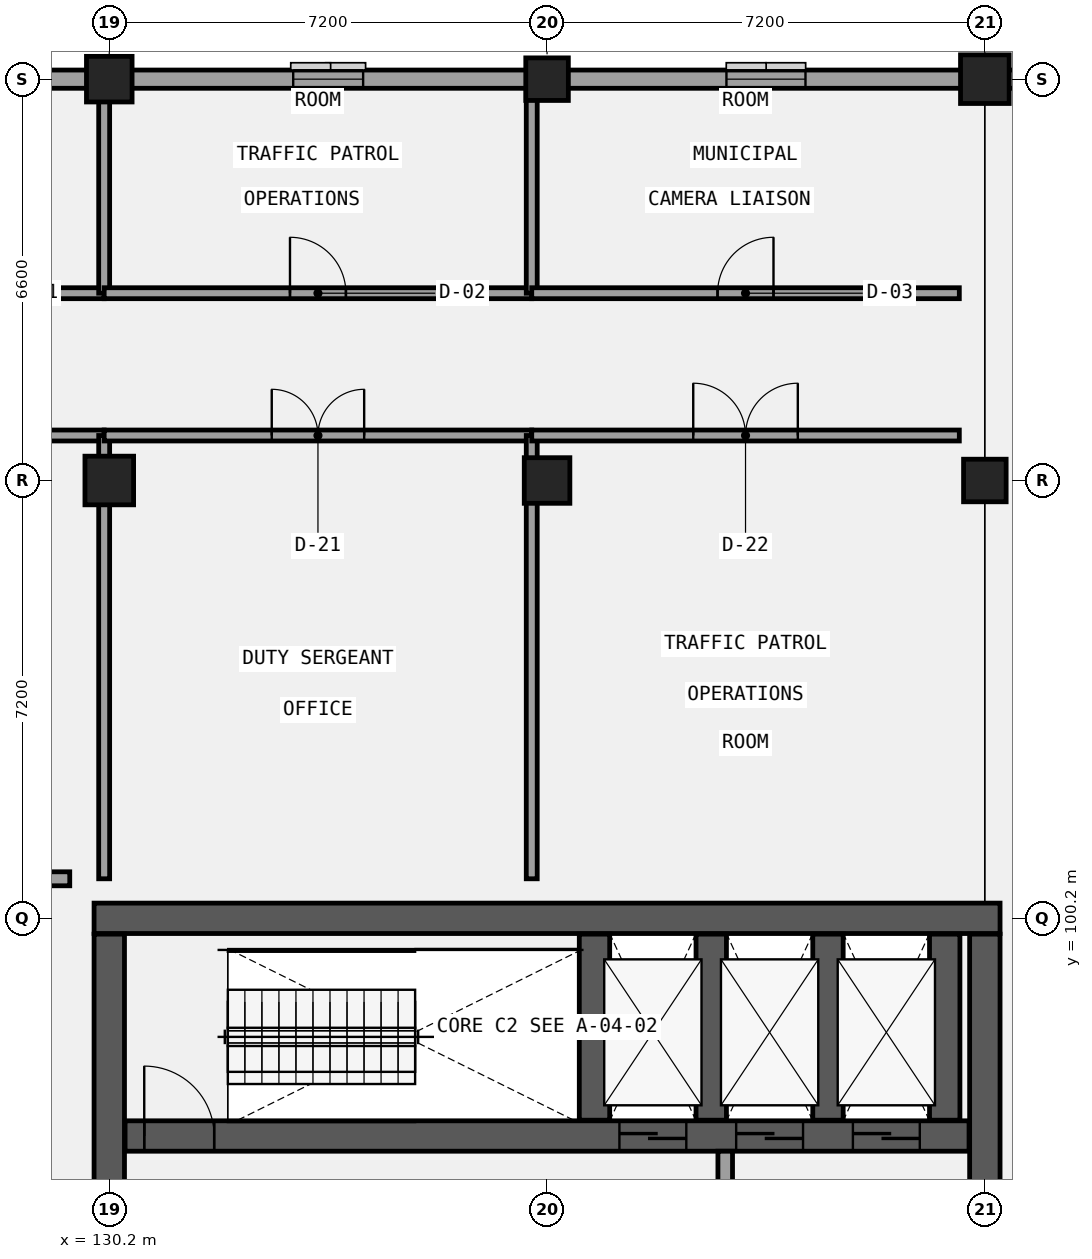
"""IFC4 building model, lengths in metres.
Left out: names, types, materials, properties, quantities, classifications, styles, units other than length and angle.
Written with IfcOpenShell. Run it as: python <this file> out.ifc"""

import sys

from ifc_helpers import new_model, si_unit, direction, frame, frame_2d, origin, origin_2d, place, context, subcontext, project, spatial, rectangle, extrude, element, fill, save


model = new_model("IFC4")
c1 = context("Model", 3, precision=1e-05, world=origin(), true_north=direction((0.0, 1.0)))
c2 = subcontext(c1, "Body", "Model", "MODEL_VIEW")
j1 = project(units=[si_unit("LENGTHUNIT", "METRE"), si_unit("PLANEANGLEUNIT", "RADIAN")], contexts=[c1])
p1 = place(None, origin())
s1 = spatial("IfcSite", under=j1, at=p1, CompositionType="ELEMENT")
p2 = place(p1, origin())
s2 = spatial("IfcBuilding", under=s1, at=p2, CompositionType="ELEMENT")
p3 = place(p2, frame((0.0, 0.0, 5.4)))
s3 = spatial("IfcBuildingStorey", under=s2, at=p3, CompositionType="ELEMENT", Elevation=5.4)
p4 = place(p3, frame((129.95, 100.2, 0.0), z_axis=(0.0, 0.0, 1.0), x_axis=(1.0, 0.0, 0.0)))
e1 = element("IfcWall", 1, at=p4, inside=s3, PredefinedType="SHEAR", context=c2, shape_type="SweptSolid", body=[
    extrude(rectangle(XDim=14.9, YDim=0.5, at=frame_2d((7.45, 0.0))), origin(), (0.0, 0.0, 1.0), 4.2),
])
for number, where, z_axis, x_axis in (
    (2, (130.2, 93.26, 0.0), (0.0, 0.0, 1.0), (0.0, 1.0, 0.0)),
    (3, (144.6, 93.26, 0.0), (0.0, 0.0, 1.0), (0.0, 1.0, 0.0)),
):
    element("IfcWall", number, at=place(p3, frame(where, z_axis=z_axis, x_axis=x_axis)), inside=s3, PredefinedType="SHEAR", context=c2, shape_type="SweptSolid", body=[
        extrude(rectangle(XDim=6.68, YDim=0.5, at=frame_2d((3.34, 0.0))), origin(), (0.0, 0.0, 1.0), 4.2),
    ])
p5 = place(p3, frame((130.46, 96.62, 0.0), z_axis=(0.0, 0.0, 1.0), x_axis=(1.0, 0.0, 0.0)))
e4 = element("IfcWall", 4, at=p5, inside=s3, PredefinedType="SHEAR", context=c2, shape_type="SweptSolid", body=[
    extrude(rectangle(XDim=13.88, YDim=0.5, at=frame_2d((6.94, 0.0))), origin(), (0.0, 0.0, 1.0), 4.2),
])
p6 = place(p5, frame((8.13, 0.0, 0.0)))
e5 = element("IfcOpeningElement", 5, at=p6, cuts=e4, PredefinedType="OPENING", context=c2, shape_type="SweptSolid", body=[
    extrude(rectangle(XDim=1.1, YDim=2.15, at=frame_2d((0.55, 1.075))), frame((0.0, 0.26, 0.0), z_axis=(0.0, -1.0, 0.0), x_axis=(1.0, 0.0, 0.0)), (0.0, 0.0, 1.0), 0.52),
])
p7 = place(p5, frame((10.05, 0.0, 0.0)))
e6 = element("IfcOpeningElement", 6, at=p7, cuts=e4, PredefinedType="OPENING", context=c2, shape_type="SweptSolid", body=[
    extrude(rectangle(XDim=1.1, YDim=2.15, at=frame_2d((0.55, 1.075))), frame((0.0, 0.26, 0.0), z_axis=(0.0, -1.0, 0.0), x_axis=(1.0, 0.0, 0.0)), (0.0, 0.0, 1.0), 0.52),
])
p8 = place(p5, frame((11.97, 0.0, 0.0)))
e7 = element("IfcOpeningElement", 7, at=p8, cuts=e4, PredefinedType="OPENING", context=c2, shape_type="SweptSolid", body=[
    extrude(rectangle(XDim=1.1, YDim=2.15, at=frame_2d((0.55, 1.075))), frame((0.0, 0.26, 0.0), z_axis=(0.0, -1.0, 0.0), x_axis=(1.0, 0.0, 0.0)), (0.0, 0.0, 1.0), 0.52),
])
p9 = place(p5, frame((0.315, 0.0, 0.0)))
e8 = element("IfcOpeningElement", 8, at=p9, cuts=e4, PredefinedType="OPENING", context=c2, shape_type="SweptSolid", body=[
    extrude(rectangle(XDim=1.15, YDim=2.15, at=frame_2d((0.575, 1.075))), frame((0.0, 0.26, 0.0), z_axis=(0.0, -1.0, 0.0), x_axis=(1.0, 0.0, 0.0)), (0.0, 0.0, 1.0), 0.52),
])
for number, where, z_axis, x_axis in (
    (9, (138.18, 96.88, 0.0), (0.0, 0.0, 1.0), (0.0, 1.0, 0.0)),
    (10, (140.1, 96.88, 0.0), (0.0, 0.0, 1.0), (0.0, 1.0, 0.0)),
    (11, (142.02, 96.88, 0.0), (0.0, 0.0, 1.0), (0.0, 1.0, 0.0)),
    (12, (143.94, 96.88, 0.0), (0.0, 0.0, 1.0), (0.0, 1.0, 0.0)),
):
    element("IfcWall", number, at=place(p3, frame(where, z_axis=z_axis, x_axis=x_axis)), inside=s3, PredefinedType="SHEAR", context=c2, shape_type="SweptSolid", body=[
        extrude(rectangle(XDim=3.06, YDim=0.5, at=frame_2d((1.53, 0.0))), origin(), (0.0, 0.0, 1.0), 4.2),
    ])
p10 = place(p3, frame((130.2, 107.4, 0.0), z_axis=(0.0, 0.0, 1.0), x_axis=(1.0, 0.0, 0.0)))
e13 = element("IfcColumn", 13, at=p10, inside=s3, PredefinedType="COLUMN", context=c2, shape_type="SweptSolid", body=[
    extrude(rectangle(XDim=0.8, YDim=0.8, at=origin_2d()), origin(), (0.0, 0.0, 1.0), 4.2),
])
for number, where, z_axis, x_axis in (
    (14, (130.2, 114.0, 0.0), (0.0, 0.0, 1.0), (1.0, 0.0, 0.0)),
    (15, (137.4, 107.4, 0.0), (0.0, 0.0, 1.0), (1.0, 0.0, 0.0)),
):
    element("IfcColumn", number, at=place(p3, frame(where, z_axis=z_axis, x_axis=x_axis)), inside=s3, PredefinedType="COLUMN", context=c2, shape_type="SweptSolid", body=[
        extrude(rectangle(XDim=0.75, YDim=0.75, at=origin_2d()), origin(), (0.0, 0.0, 1.0), 4.2),
    ])
for number, where, z_axis, x_axis in (
    (16, (137.4, 114.0, 0.0), (0.0, 0.0, 1.0), (1.0, 0.0, 0.0)),
    (17, (144.6, 107.4, 0.0), (0.0, 0.0, 1.0), (1.0, 0.0, 0.0)),
):
    element("IfcColumn", number, at=place(p3, frame(where, z_axis=z_axis, x_axis=x_axis)), inside=s3, PredefinedType="COLUMN", context=c2, shape_type="SweptSolid", body=[
        extrude(rectangle(XDim=0.7, YDim=0.7, at=origin_2d()), origin(), (0.0, 0.0, 1.0), 4.2),
    ])
p11 = place(p3, frame((144.6, 114.0, 0.0), z_axis=(0.0, 0.0, 1.0), x_axis=(1.0, 0.0, 0.0)))
e18 = element("IfcColumn", 18, at=p11, inside=s3, PredefinedType="COLUMN", context=c2, shape_type="SweptSolid", body=[
    extrude(rectangle(XDim=0.8, YDim=0.8, at=origin_2d()), origin(), (0.0, 0.0, 1.0), 4.2),
])
p12 = place(p3, frame((140.33, 93.25, 0.0), z_axis=(0.0, 0.0, 1.0), x_axis=(0.0, 1.0, 0.0)))
e19 = element("IfcWall", 19, at=p12, inside=s3, PredefinedType="SOLIDWALL", context=c2, shape_type="SweptSolid", body=[
    extrude(rectangle(XDim=3.12, YDim=0.24, at=frame_2d((1.56, 0.0))), origin(), (0.0, 0.0, 1.0), 3.89),
])
p13 = place(p3, frame((166.35, 114.0, 0.0), z_axis=(0.0, 0.0, 1.0), x_axis=(-1.0, 0.0, 0.0)))
e20 = element("IfcWall", 20, at=p13, inside=s3, PredefinedType="SOLIDWALL", context=c2, shape_type="SweptSolid", body=[
    extrude(rectangle(XDim=21.9, YDim=0.3, at=frame_2d((10.95, 0.0))), origin(), (0.0, 0.0, 1.0), 3.17),
])
p14 = place(p13, frame((17.65, 0.0, 0.95)))
e21 = element("IfcOpeningElement", 21, at=p14, cuts=e20, PredefinedType="OPENING", context=c2, shape_type="SweptSolid", body=[
    extrude(rectangle(XDim=1.0, YDim=1.9, at=frame_2d((0.5, 0.95))), frame((0.0, 0.16, 0.0), z_axis=(0.0, -1.0, 0.0), x_axis=(1.0, 0.0, 0.0)), (0.0, 0.0, 1.0), 0.32),
])
p15 = place(p3, frame((144.75, 114.0, 0.0), z_axis=(0.0, 0.0, 1.0), x_axis=(-1.0, 0.0, 0.0)))
e22 = element("IfcWall", 22, at=p15, inside=s3, PredefinedType="SOLIDWALL", context=c2, shape_type="SweptSolid", body=[
    extrude(rectangle(XDim=36.3, YDim=0.3, at=frame_2d((18.15, 0.0))), origin(), (0.0, 0.0, 1.0), 3.17),
])
p16 = place(p15, frame((32.05, 0.0, 0.95)))
e23 = element("IfcOpeningElement", 23, at=p16, cuts=e22, PredefinedType="OPENING", context=c2, shape_type="SweptSolid", body=[
    extrude(rectangle(XDim=1.0, YDim=1.9, at=frame_2d((0.5, 0.95))), frame((0.0, 0.16, 0.0), z_axis=(0.0, -1.0, 0.0), x_axis=(1.0, 0.0, 0.0)), (0.0, 0.0, 1.0), 0.32),
])
p17 = place(p15, frame((24.775, 0.0, 0.95)))
e24 = element("IfcOpeningElement", 24, at=p17, cuts=e22, PredefinedType="OPENING", context=c2, shape_type="SweptSolid", body=[
    extrude(rectangle(XDim=1.15, YDim=1.4, at=frame_2d((0.575, 0.7))), frame((0.0, 0.16, 0.0), z_axis=(0.0, -1.0, 0.0), x_axis=(1.0, 0.0, 0.0)), (0.0, 0.0, 1.0), 0.32),
])
p18 = place(p15, frame((17.575, 0.0, 0.95)))
e25 = element("IfcOpeningElement", 25, at=p18, cuts=e22, PredefinedType="OPENING", context=c2, shape_type="SweptSolid", body=[
    extrude(rectangle(XDim=1.15, YDim=1.65, at=frame_2d((0.575, 0.825))), frame((0.0, 0.16, 0.0), z_axis=(0.0, -1.0, 0.0), x_axis=(1.0, 0.0, 0.0)), (0.0, 0.0, 1.0), 0.32),
])
p19 = place(p15, frame((10.375, 0.0, 0.95)))
e26 = element("IfcOpeningElement", 26, at=p19, cuts=e22, PredefinedType="OPENING", context=c2, shape_type="SweptSolid", body=[
    extrude(rectangle(XDim=1.15, YDim=1.9, at=frame_2d((0.575, 0.95))), frame((0.0, 0.16, 0.0), z_axis=(0.0, -1.0, 0.0), x_axis=(1.0, 0.0, 0.0)), (0.0, 0.0, 1.0), 0.32),
])
p20 = place(p15, frame((3.1, 0.0, 0.95)))
e27 = element("IfcOpeningElement", 27, at=p20, cuts=e22, PredefinedType="OPENING", context=c2, shape_type="SweptSolid", body=[
    extrude(rectangle(XDim=1.3, YDim=1.4, at=frame_2d((0.65, 0.7))), frame((0.0, 0.16, 0.0), z_axis=(0.0, -1.0, 0.0), x_axis=(1.0, 0.0, 0.0)), (0.0, 0.0, 1.0), 0.32),
])
p21 = place(p3, frame((123.084, 108.14, 0.0), z_axis=(0.0, 0.0, 1.0), x_axis=(1.0, 0.0, 0.0)))
e28 = element("IfcWall", 28, at=p21, inside=s3, PredefinedType="PARTITIONING", context=c2, shape_type="SweptSolid", body=[
    extrude(rectangle(XDim=7.032, YDim=0.18, at=frame_2d((3.516, 0.0))), origin(), (0.0, 0.0, 1.0), 3.92),
])
p22 = place(p21, frame((2.756, 0.0, 0.0)))
e29 = element("IfcOpeningElement", 29, at=p22, cuts=e28, PredefinedType="OPENING", context=c2, shape_type="SweptSolid", body=[
    extrude(rectangle(XDim=1.52, YDim=2.22, at=frame_2d((0.76, 1.11))), frame((0.0, 0.1, 0.0), z_axis=(0.0, -1.0, 0.0), x_axis=(1.0, 0.0, 0.0)), (0.0, 0.0, 1.0), 0.2),
])
p23 = place(p3, frame((130.116, 100.85, 0.0), z_axis=(0.0, 0.0, 1.0), x_axis=(0.0, 1.0, 0.0)))
e30 = element("IfcWall", 30, at=p23, inside=s3, PredefinedType="PARTITIONING", context=c2, shape_type="SweptSolid", body=[
    extrude(rectangle(XDim=7.29, YDim=0.18, at=frame_2d((3.645, 0.0))), origin(), (0.0, 0.0, 1.0), 3.17),
])
p24 = place(p3, frame((130.116, 108.14, 0.0), z_axis=(0.0, 0.0, 1.0), x_axis=(1.0, 0.0, 0.0)))
e31 = element("IfcWall", 31, at=p24, inside=s3, PredefinedType="PARTITIONING", context=c2, shape_type="SweptSolid", body=[
    extrude(rectangle(XDim=7.032, YDim=0.18, at=frame_2d((3.516, 0.0))), origin(), (0.0, 0.0, 1.0), 3.92),
])
p25 = place(p24, frame((2.756, 0.0, 0.0)))
e32 = element("IfcOpeningElement", 32, at=p25, cuts=e31, PredefinedType="OPENING", context=c2, shape_type="SweptSolid", body=[
    extrude(rectangle(XDim=1.52, YDim=2.35, at=frame_2d((0.76, 1.175))), frame((0.0, 0.1, 0.0), z_axis=(0.0, -1.0, 0.0), x_axis=(1.0, 0.0, 0.0)), (0.0, 0.0, 1.0), 0.2),
])
p26 = place(p3, frame((137.148, 100.85, 0.0), z_axis=(0.0, 0.0, 1.0), x_axis=(0.0, 1.0, 0.0)))
e33 = element("IfcWall", 33, at=p26, inside=s3, PredefinedType="PARTITIONING", context=c2, shape_type="SweptSolid", body=[
    extrude(rectangle(XDim=7.29, YDim=0.18, at=frame_2d((3.645, 0.0))), origin(), (0.0, 0.0, 1.0), 3.17),
])
p27 = place(p3, frame((137.148, 108.14, 0.0), z_axis=(0.0, 0.0, 1.0), x_axis=(1.0, 0.0, 0.0)))
e34 = element("IfcWall", 34, at=p27, inside=s3, PredefinedType="PARTITIONING", context=c2, shape_type="SweptSolid", body=[
    extrude(rectangle(XDim=7.032, YDim=0.18, at=frame_2d((3.516, 0.0))), origin(), (0.0, 0.0, 1.0), 3.92),
])
p28 = place(p27, frame((2.656, 0.0, 0.0)))
e35 = element("IfcOpeningElement", 35, at=p28, cuts=e34, PredefinedType="OPENING", context=c2, shape_type="SweptSolid", body=[
    extrude(rectangle(XDim=1.72, YDim=2.1, at=frame_2d((0.86, 1.05))), frame((0.0, 0.1, 0.0), z_axis=(0.0, -1.0, 0.0), x_axis=(1.0, 0.0, 0.0)), (0.0, 0.0, 1.0), 0.2),
])
p29 = place(p3, frame((123.084, 110.48, 0.0), z_axis=(0.0, 0.0, 1.0), x_axis=(1.0, 0.0, 0.0)))
e36 = element("IfcWall", 36, at=p29, inside=s3, PredefinedType="PARTITIONING", context=c2, shape_type="SweptSolid", body=[
    extrude(rectangle(XDim=7.032, YDim=0.18, at=frame_2d((3.516, 0.0))), origin(), (0.0, 0.0, 1.0), 3.37),
])
p30 = place(p29, frame((3.056, 0.0, 0.0)))
e37 = element("IfcOpeningElement", 37, at=p30, cuts=e36, PredefinedType="OPENING", context=c2, shape_type="SweptSolid", body=[
    extrude(rectangle(XDim=0.92, YDim=2.1, at=frame_2d((0.46, 1.05))), frame((0.0, 0.1, 0.0), z_axis=(0.0, -1.0, 0.0), x_axis=(1.0, 0.0, 0.0)), (0.0, 0.0, 1.0), 0.2),
])
p31 = place(p3, frame((130.116, 110.48, 0.0), z_axis=(0.0, 0.0, 1.0), x_axis=(0.0, 1.0, 0.0)))
e38 = element("IfcWall", 38, at=p31, inside=s3, PredefinedType="PARTITIONING", context=c2, shape_type="SweptSolid", body=[
    extrude(rectangle(XDim=3.34, YDim=0.18, at=frame_2d((1.67, 0.0))), origin(), (0.0, 0.0, 1.0), 3.17),
])
p32 = place(p3, frame((130.116, 110.48, 0.0), z_axis=(0.0, 0.0, 1.0), x_axis=(1.0, 0.0, 0.0)))
e39 = element("IfcWall", 39, at=p32, inside=s3, PredefinedType="PARTITIONING", context=c2, shape_type="SweptSolid", body=[
    extrude(rectangle(XDim=7.032, YDim=0.18, at=frame_2d((3.516, 0.0))), origin(), (0.0, 0.0, 1.0), 3.37),
])
p33 = place(p32, frame((3.056, 0.0, 0.0)))
e40 = element("IfcOpeningElement", 40, at=p33, cuts=e39, PredefinedType="OPENING", context=c2, shape_type="SweptSolid", body=[
    extrude(rectangle(XDim=0.92, YDim=2.22, at=frame_2d((0.46, 1.11))), frame((0.0, 0.1, 0.0), z_axis=(0.0, -1.0, 0.0), x_axis=(1.0, 0.0, 0.0)), (0.0, 0.0, 1.0), 0.2),
])
p34 = place(p3, frame((137.148, 110.48, 0.0), z_axis=(0.0, 0.0, 1.0), x_axis=(0.0, 1.0, 0.0)))
e41 = element("IfcWall", 41, at=p34, inside=s3, PredefinedType="PARTITIONING", context=c2, shape_type="SweptSolid", body=[
    extrude(rectangle(XDim=3.34, YDim=0.18, at=frame_2d((1.67, 0.0))), origin(), (0.0, 0.0, 1.0), 3.22),
])
p35 = place(p3, frame((137.148, 110.48, 0.0), z_axis=(0.0, 0.0, 1.0), x_axis=(1.0, 0.0, 0.0)))
e42 = element("IfcWall", 42, at=p35, inside=s3, PredefinedType="PARTITIONING", context=c2, shape_type="SweptSolid", body=[
    extrude(rectangle(XDim=7.032, YDim=0.18, at=frame_2d((3.516, 0.0))), origin(), (0.0, 0.0, 1.0), 3.37),
])
p36 = place(p35, frame((3.056, 0.0, 0.0)))
e43 = element("IfcOpeningElement", 43, at=p36, cuts=e42, PredefinedType="OPENING", context=c2, shape_type="SweptSolid", body=[
    extrude(rectangle(XDim=0.92, YDim=2.35, at=frame_2d((0.46, 1.175))), frame((0.0, 0.1, 0.0), z_axis=(0.0, -1.0, 0.0), x_axis=(1.0, 0.0, 0.0)), (0.0, 0.0, 1.0), 0.2),
])
p37 = place(p3, frame((126.27, 100.85, 0.0), z_axis=(0.0, 0.0, 1.0), x_axis=(1.0, 0.0, 0.0)))
e44 = element("IfcWall", 44, at=p37, inside=s3, PredefinedType="PARTITIONING", context=c2, shape_type="SweptSolid", body=[
    extrude(rectangle(XDim=3.28, YDim=0.23, at=frame_2d((1.64, 0.0))), origin(), (0.0, 0.0, 1.0), 3.92),
])
p38 = place(p6, frame((1.1, 0.0, 0.0), z_axis=(0.0, 0.0, 1.0), x_axis=(-1.0, 0.0, 0.0)))
e45 = element("IfcDoor", 45, at=p38, inside=s3, OperationType="DOUBLE_DOOR_SLIDING", PredefinedType="DOOR", context=c2, shape_type="SweptSolid", body=[
    extrude(rectangle(XDim=1.1, YDim=2.15, at=frame_2d((0.55, 1.075))), frame((0.0, 0.025, 0.0), z_axis=(0.0, -1.0, 0.0), x_axis=(1.0, 0.0, 0.0)), (0.0, 0.0, 1.0), 0.05),
])
fill(e5, e45)
p39 = place(p7, frame((1.1, 0.0, 0.0), z_axis=(0.0, 0.0, 1.0), x_axis=(-1.0, 0.0, 0.0)))
e46 = element("IfcDoor", 46, at=p39, inside=s3, OperationType="DOUBLE_DOOR_SLIDING", PredefinedType="DOOR", context=c2, shape_type="SweptSolid", body=[
    extrude(rectangle(XDim=1.1, YDim=2.15, at=frame_2d((0.55, 1.075))), frame((0.0, 0.025, 0.0), z_axis=(0.0, -1.0, 0.0), x_axis=(1.0, 0.0, 0.0)), (0.0, 0.0, 1.0), 0.05),
])
fill(e6, e46)
p40 = place(p8, frame((1.1, 0.0, 0.0), z_axis=(0.0, 0.0, 1.0), x_axis=(-1.0, 0.0, 0.0)))
e47 = element("IfcDoor", 47, at=p40, inside=s3, OperationType="DOUBLE_DOOR_SLIDING", PredefinedType="DOOR", context=c2, shape_type="SweptSolid", body=[
    extrude(rectangle(XDim=1.1, YDim=2.15, at=frame_2d((0.55, 1.075))), frame((0.0, 0.025, 0.0), z_axis=(0.0, -1.0, 0.0), x_axis=(1.0, 0.0, 0.0)), (0.0, 0.0, 1.0), 0.05),
])
fill(e7, e47)
p41 = place(p9, origin())
e48 = element("IfcDoor", 48, at=p41, inside=s3, OperationType="SINGLE_SWING_LEFT", PredefinedType="DOOR", context=c2, shape_type="SweptSolid", body=[
    extrude(rectangle(XDim=1.15, YDim=2.15, at=frame_2d((0.575, 1.075))), frame((0.0, 0.025, 0.0), z_axis=(0.0, -1.0, 0.0), x_axis=(1.0, 0.0, 0.0)), (0.0, 0.0, 1.0), 0.05),
])
fill(e8, e48)
p42 = place(p19, origin())
e49 = element("IfcWindow", 49, at=p42, inside=s3, PartitioningType="SINGLE_PANEL", PredefinedType="WINDOW", context=c2, shape_type="SweptSolid", body=[
    extrude(rectangle(XDim=1.15, YDim=1.9, at=frame_2d((0.575, 0.95))), frame((0.0, 0.03, 0.0), z_axis=(0.0, -1.0, 0.0), x_axis=(1.0, 0.0, 0.0)), (0.0, 0.0, 1.0), 0.06),
])
fill(e26, e49)
p43 = place(p20, origin())
e50 = element("IfcWindow", 50, at=p43, inside=s3, PartitioningType="SINGLE_PANEL", PredefinedType="WINDOW", context=c2, shape_type="SweptSolid", body=[
    extrude(rectangle(XDim=1.3, YDim=1.4, at=frame_2d((0.65, 0.7))), frame((0.0, 0.03, 0.0), z_axis=(0.0, -1.0, 0.0), x_axis=(1.0, 0.0, 0.0)), (0.0, 0.0, 1.0), 0.06),
])
fill(e27, e50)
p44 = place(p25, frame((1.52, 0.0, 0.0), z_axis=(0.0, 0.0, 1.0), x_axis=(-1.0, 0.0, 0.0)))
e51 = element("IfcDoor", 51, at=p44, inside=s3, OperationType="DOUBLE_DOOR_SINGLE_SWING", PredefinedType="DOOR", context=c2, shape_type="SweptSolid", body=[
    extrude(rectangle(XDim=1.52, YDim=2.35, at=frame_2d((0.76, 1.175))), frame((0.0, 0.025, 0.0), z_axis=(0.0, -1.0, 0.0), x_axis=(1.0, 0.0, 0.0)), (0.0, 0.0, 1.0), 0.05),
])
fill(e32, e51)
p45 = place(p28, frame((1.72, 0.0, 0.0), z_axis=(0.0, 0.0, 1.0), x_axis=(-1.0, 0.0, 0.0)))
e52 = element("IfcDoor", 52, at=p45, inside=s3, OperationType="DOUBLE_DOOR_SINGLE_SWING", PredefinedType="DOOR", context=c2, shape_type="SweptSolid", body=[
    extrude(rectangle(XDim=1.72, YDim=2.1, at=frame_2d((0.86, 1.05))), frame((0.0, 0.025, 0.0), z_axis=(0.0, -1.0, 0.0), x_axis=(1.0, 0.0, 0.0)), (0.0, 0.0, 1.0), 0.05),
])
fill(e35, e52)
p46 = place(p33, origin())
e53 = element("IfcDoor", 53, at=p46, inside=s3, OperationType="SINGLE_SWING_LEFT", PredefinedType="DOOR", context=c2, shape_type="SweptSolid", body=[
    extrude(rectangle(XDim=0.92, YDim=2.22, at=frame_2d((0.46, 1.11))), frame((0.0, 0.025, 0.0), z_axis=(0.0, -1.0, 0.0), x_axis=(1.0, 0.0, 0.0)), (0.0, 0.0, 1.0), 0.05),
])
fill(e40, e53)
p47 = place(p36, origin())
e54 = element("IfcDoor", 54, at=p47, inside=s3, OperationType="SINGLE_SWING_RIGHT", PredefinedType="DOOR", context=c2, shape_type="SweptSolid", body=[
    extrude(rectangle(XDim=0.92, YDim=2.35, at=frame_2d((0.46, 1.175))), frame((0.0, 0.025, 0.0), z_axis=(0.0, -1.0, 0.0), x_axis=(1.0, 0.0, 0.0)), (0.0, 0.0, 1.0), 0.05),
])
fill(e43, e54)
save(model, sys.argv[1])
